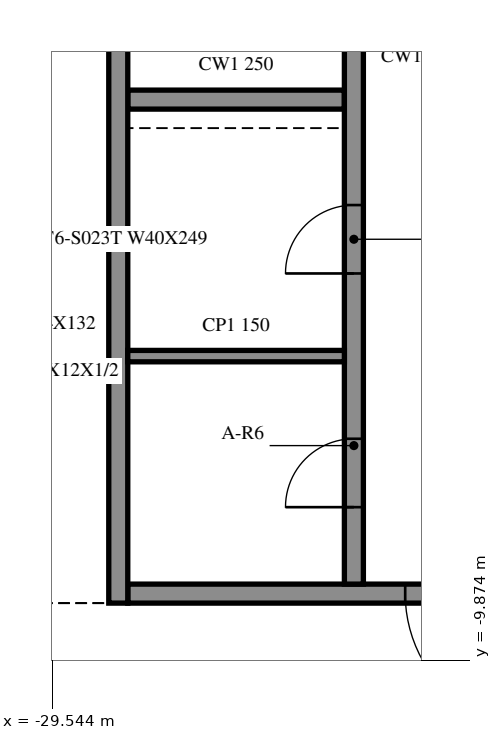
"""IFC4 building model, lengths in metres.
Left out: names, types, materials, properties, quantities, classifications, styles, units other than length and angle.
Written with IfcOpenShell. Run it as: python <this file> out.ifc"""

import sys

from ifc_helpers import new_model, si_unit, direction, frame, frame_2d, origin, place, context, subcontext, project, spatial, rectangle, extrude, element, fill, save


model = new_model("IFC4")
c1 = context("Model", 3, precision=1e-05, world=origin(), true_north=direction((0.0, 1.0)))
c2 = subcontext(c1, "Body", "Model", "MODEL_VIEW")
j1 = project(units=[si_unit("LENGTHUNIT", "METRE"), si_unit("PLANEANGLEUNIT", "RADIAN")], contexts=[c1])
p1 = place(None, origin())
s1 = spatial("IfcSite", under=j1, at=p1, CompositionType="ELEMENT")
p2 = place(p1, origin())
s2 = spatial("IfcBuilding", under=s1, at=p2, CompositionType="ELEMENT")
p3 = place(p2, frame((0.0, 0.0, 224.3)))
s3 = spatial("IfcBuildingStorey", under=s2, at=p3, CompositionType="ELEMENT", Elevation=224.3)
p4 = place(p3, frame((-28.675, 15.125, 0.0), z_axis=(0.0, 0.0, 1.0), x_axis=(0.0, -1.0, 0.0)))
e1 = element("IfcWall", 1, at=p4, inside=s3, PredefinedType="SOLIDWALL", context=c2, shape_type="SweptSolid", body=[
    extrude(rectangle(XDim=24.25, YDim=0.25, at=frame_2d((12.125, 0.0))), origin(), (0.0, 0.0, 1.0), 3.96),
])
p5 = place(p3, frame((-19.45, -9.0, 0.0), z_axis=(0.0, 0.0, 1.0), x_axis=(-1.0, 0.0, 0.0)))
e2 = element("IfcWall", 2, at=p5, inside=s3, PredefinedType="SOLIDWALL", context=c2, shape_type="SweptSolid", body=[
    extrude(rectangle(XDim=9.1, YDim=0.25, at=frame_2d((4.55, 0.0))), origin(), (0.0, 0.0, 1.0), 3.96),
])
p6 = place(p5, frame((3.65, 0.0, 0.0)))
e3 = element("IfcOpeningElement", 3, at=p6, cuts=e2, PredefinedType="OPENING", context=c2, shape_type="SweptSolid", body=[
    extrude(rectangle(XDim=1.8, YDim=2.1, at=frame_2d((0.9, 1.05))), frame((0.0, 0.135, 0.0), z_axis=(0.0, -1.0, 0.0), x_axis=(1.0, 0.0, 0.0)), (0.0, 0.0, 1.0), 0.27),
])
p7 = place(p3, frame((-25.575, -8.875, 0.0), z_axis=(0.0, 0.0, 1.0), x_axis=(0.0, 1.0, 0.0)))
e4 = element("IfcWall", 4, at=p7, inside=s3, PredefinedType="SOLIDWALL", context=c2, shape_type="SweptSolid", body=[
    extrude(rectangle(XDim=17.5, YDim=0.25, at=frame_2d((8.75, 0.0))), origin(), (0.0, 0.0, 1.0), 3.96),
])
p8 = place(p7, frame((9.775, 0.0, 0.0)))
e5 = element("IfcOpeningElement", 5, at=p8, cuts=e4, PredefinedType="OPENING", context=c2, shape_type="SweptSolid", body=[
    extrude(rectangle(XDim=0.9, YDim=2.1, at=frame_2d((0.45, 1.05))), frame((0.0, 0.135, 0.0), z_axis=(0.0, -1.0, 0.0), x_axis=(1.0, 0.0, 0.0)), (0.0, 0.0, 1.0), 0.27),
])
p9 = place(p7, frame((15.225, 0.0, 0.0)))
e6 = element("IfcOpeningElement", 6, at=p9, cuts=e4, PredefinedType="OPENING", context=c2, shape_type="SweptSolid", body=[
    extrude(rectangle(XDim=0.9, YDim=2.1, at=frame_2d((0.45, 1.05))), frame((0.0, 0.135, 0.0), z_axis=(0.0, -1.0, 0.0), x_axis=(1.0, 0.0, 0.0)), (0.0, 0.0, 1.0), 0.27),
])
p10 = place(p7, frame((1.012, 0.0, 0.0)))
e7 = element("IfcOpeningElement", 7, at=p10, cuts=e4, PredefinedType="OPENING", context=c2, shape_type="SweptSolid", body=[
    extrude(rectangle(XDim=0.9, YDim=2.1, at=frame_2d((0.45, 1.05))), frame((0.0, 0.135, 0.0), z_axis=(0.0, -1.0, 0.0), x_axis=(1.0, 0.0, 0.0)), (0.0, 0.0, 1.0), 0.27),
])
p11 = place(p7, frame((4.087, 0.0, 0.0)))
e8 = element("IfcOpeningElement", 8, at=p11, cuts=e4, PredefinedType="OPENING", context=c2, shape_type="SweptSolid", body=[
    extrude(rectangle(XDim=0.9, YDim=2.1, at=frame_2d((0.45, 1.05))), frame((0.0, 0.135, 0.0), z_axis=(0.0, -1.0, 0.0), x_axis=(1.0, 0.0, 0.0)), (0.0, 0.0, 1.0), 0.27),
])
p12 = place(p3, frame((-28.55, -2.5, 0.0), z_axis=(0.0, 0.0, 1.0), x_axis=(1.0, 0.0, 0.0)))
e9 = element("IfcWall", 9, at=p12, inside=s3, PredefinedType="SOLIDWALL", context=c2, shape_type="SweptSolid", body=[
    extrude(rectangle(XDim=2.85, YDim=0.25, at=frame_2d((1.425, 0.0))), origin(), (0.0, 0.0, 1.0), 3.96),
])
p13 = place(p3, frame((-28.55, -5.875, 0.0), z_axis=(0.0, 0.0, 1.0), x_axis=(1.0, 0.0, 0.0)))
e10 = element("IfcWall", 10, at=p13, inside=s3, PredefinedType="PARTITIONING", context=c2, shape_type="SweptSolid", body=[
    extrude(rectangle(XDim=2.85, YDim=0.15, at=frame_2d((1.425, 0.0))), origin(), (0.0, 0.0, 1.0), 3.96),
])
p14 = place(p6, origin())
e11 = element("IfcDoor", 11, at=p14, inside=s3, OperationType="DOUBLE_DOOR_SINGLE_SWING", PredefinedType="DOOR", context=c2, shape_type="SweptSolid", body=[
    extrude(rectangle(XDim=1.8, YDim=2.1, at=frame_2d((0.9, 1.05))), frame((0.0, 0.025, 0.0), z_axis=(0.0, -1.0, 0.0), x_axis=(1.0, 0.0, 0.0)), (0.0, 0.0, 1.0), 0.05),
])
fill(e3, e11)
p15 = place(p10, origin())
e12 = element("IfcDoor", 12, at=p15, inside=s3, OperationType="SINGLE_SWING_RIGHT", PredefinedType="DOOR", context=c2, shape_type="SweptSolid", body=[
    extrude(rectangle(XDim=0.9, YDim=2.1, at=frame_2d((0.45, 1.05))), frame((0.0, 0.025, 0.0), z_axis=(0.0, -1.0, 0.0), x_axis=(1.0, 0.0, 0.0)), (0.0, 0.0, 1.0), 0.05),
])
fill(e7, e12)
p16 = place(p11, origin())
e13 = element("IfcDoor", 13, at=p16, inside=s3, OperationType="SINGLE_SWING_LEFT", PredefinedType="DOOR", context=c2, shape_type="SweptSolid", body=[
    extrude(rectangle(XDim=0.9, YDim=2.1, at=frame_2d((0.45, 1.05))), frame((0.0, 0.025, 0.0), z_axis=(0.0, -1.0, 0.0), x_axis=(1.0, 0.0, 0.0)), (0.0, 0.0, 1.0), 0.05),
])
fill(e8, e13)
save(model, sys.argv[1])
